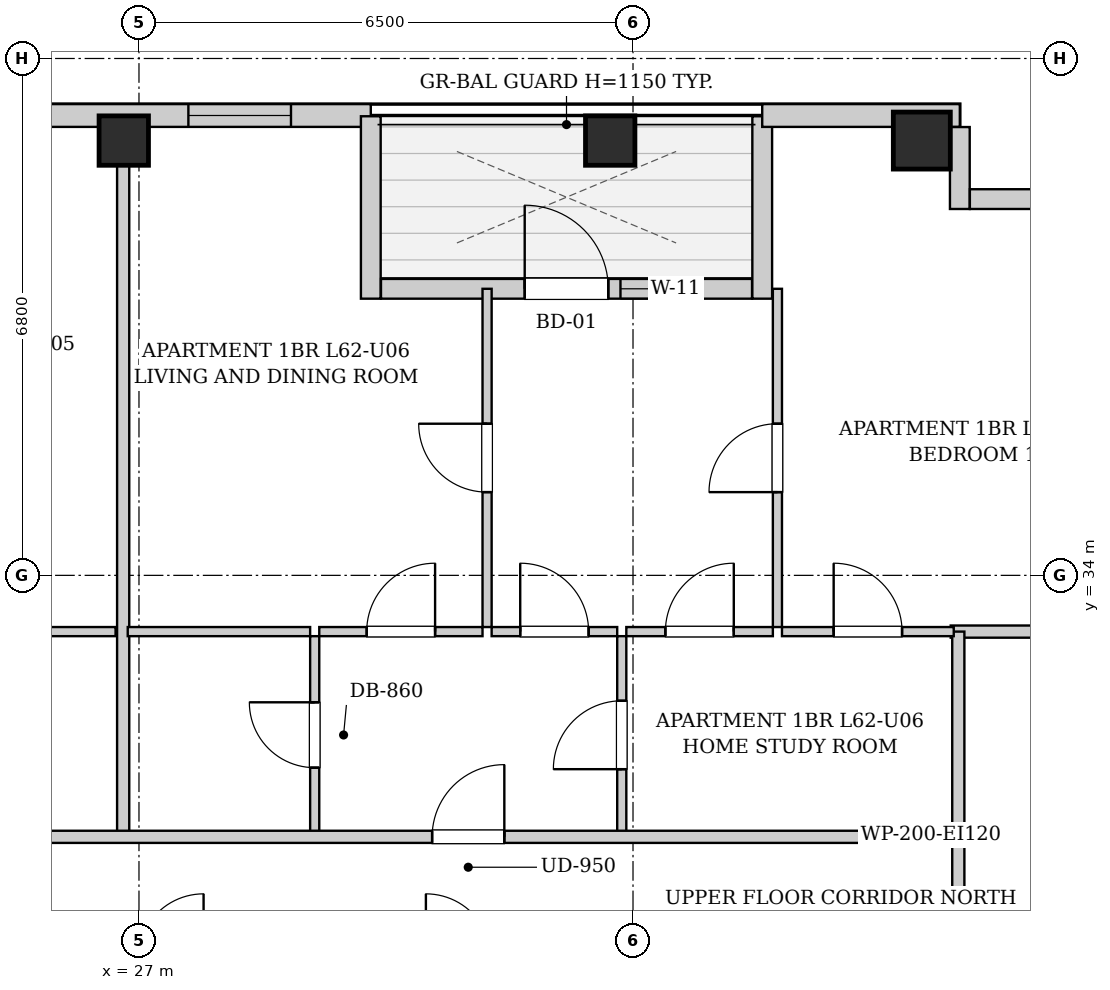
"""IFC4 building model, lengths in metres.
Left out: names, types, materials, properties, quantities, classifications, styles, units other than length and angle.
Written with IfcOpenShell. Run it as: python <this file> out.ifc"""

import sys

from ifc_helpers import new_model, si_unit, direction, frame, frame_2d, origin, origin_2d, place, context, subcontext, project, spatial, rectangle, extrude, element, fill, save


model = new_model("IFC4")
c1 = context("Model", 3, precision=1e-05, world=origin(), true_north=direction((0.0, 1.0)))
c2 = subcontext(c1, "Body", "Model", "MODEL_VIEW")
j1 = project(units=[si_unit("LENGTHUNIT", "METRE"), si_unit("PLANEANGLEUNIT", "RADIAN")], contexts=[c1])
p1 = place(None, origin())
s1 = spatial("IfcSite", under=j1, at=p1, CompositionType="ELEMENT")
p2 = place(p1, origin())
s2 = spatial("IfcBuilding", under=s1, at=p2, CompositionType="ELEMENT")
p3 = place(p2, frame((0.0, 0.0, 214.0)))
s3 = spatial("IfcBuildingStorey", under=s2, at=p3, CompositionType="ELEMENT", Elevation=214.0)
for number, where, z_axis, x_axis in (
    (1, (26.8, 39.72, 0.0), (0.0, 0.0, 1.0), (1.0, 0.0, 0.0)),
    (2, (33.2, 39.72, 0.0), (0.0, 0.0, 1.0), (1.0, 0.0, 0.0)),
):
    element("IfcColumn", number, at=place(p3, frame(where, z_axis=z_axis, x_axis=x_axis)), inside=s3, PredefinedType="COLUMN", context=c2, shape_type="SweptSolid", body=[
        extrude(rectangle(XDim=0.65, YDim=0.65, at=origin_2d()), origin(), (0.0, 0.0, 1.0), 3.3),
    ])
p4 = place(p3, frame((37.3, 39.72, 0.0), z_axis=(0.0, 0.0, 1.0), x_axis=(1.0, 0.0, 0.0)))
e3 = element("IfcColumn", 3, at=p4, inside=s3, PredefinedType="COLUMN", context=c2, shape_type="SweptSolid", body=[
    extrude(rectangle(XDim=0.75, YDim=0.75, at=origin_2d()), origin(), (0.0, 0.0, 1.0), 3.3),
])
p5 = place(p3, frame((13.1, 40.05, 0.0), z_axis=(0.0, 0.0, 1.0), x_axis=(1.0, 0.0, 0.0)))
e4 = element("IfcWall", 4, at=p5, inside=s3, PredefinedType="SOLIDWALL", context=c2, shape_type="SweptSolid", body=[
    extrude(rectangle(XDim=16.95, YDim=0.3, at=frame_2d((8.475, 0.0))), origin(), (0.0, 0.0, 1.0), 3.04),
])
p6 = place(p5, frame((2.865, 0.0, 0.55)))
e5 = element("IfcOpeningElement", 5, at=p6, cuts=e4, PredefinedType="OPENING", context=c2, shape_type="SweptSolid", body=[
    extrude(rectangle(XDim=1.35, YDim=1.2, at=frame_2d((0.675, 0.6))), frame((0.0, 0.16, 0.0), z_axis=(0.0, -1.0, 0.0), x_axis=(1.0, 0.0, 0.0)), (0.0, 0.0, 1.0), 0.32),
])
p7 = place(p5, frame((5.85, 0.0, 0.55)))
e6 = element("IfcOpeningElement", 6, at=p7, cuts=e4, PredefinedType="OPENING", context=c2, shape_type="SweptSolid", body=[
    extrude(rectangle(XDim=1.35, YDim=1.2, at=frame_2d((0.675, 0.6))), frame((0.0, 0.16, 0.0), z_axis=(0.0, -1.0, 0.0), x_axis=(1.0, 0.0, 0.0)), (0.0, 0.0, 1.0), 0.32),
])
p8 = place(p5, frame((8.72, 0.0, 0.55)))
e7 = element("IfcOpeningElement", 7, at=p8, cuts=e4, PredefinedType="OPENING", context=c2, shape_type="SweptSolid", body=[
    extrude(rectangle(XDim=0.68, YDim=1.2, at=frame_2d((0.34, 0.6))), frame((0.0, 0.16, 0.0), z_axis=(0.0, -1.0, 0.0), x_axis=(1.0, 0.0, 0.0)), (0.0, 0.0, 1.0), 0.32),
])
p9 = place(p5, frame((14.55, 0.0, 0.55)))
e8 = element("IfcOpeningElement", 8, at=p9, cuts=e4, PredefinedType="OPENING", context=c2, shape_type="SweptSolid", body=[
    extrude(rectangle(XDim=1.35, YDim=1.2, at=frame_2d((0.675, 0.6))), frame((0.0, 0.16, 0.0), z_axis=(0.0, -1.0, 0.0), x_axis=(1.0, 0.0, 0.0)), (0.0, 0.0, 1.0), 0.32),
])
p10 = place(p3, frame((30.05, 40.04, 0.0), z_axis=(0.0, 0.0, 1.0), x_axis=(0.0, -1.0, 0.0)))
e9 = element("IfcWall", 9, at=p10, inside=s3, PredefinedType="SOLIDWALL", context=c2, shape_type="SweptSolid", body=[
    extrude(rectangle(XDim=2.4, YDim=0.26, at=frame_2d((1.2, 0.0))), origin(), (0.0, 0.0, 1.0), 3.04),
])
p11 = place(p3, frame((30.184, 37.77, 0.0), z_axis=(0.0, 0.0, 1.0), x_axis=(1.0, 0.0, 0.0)))
e10 = element("IfcWall", 10, at=p11, inside=s3, PredefinedType="SOLIDWALL", context=c2, shape_type="SweptSolid", body=[
    extrude(rectangle(XDim=4.882, YDim=0.26, at=frame_2d((2.441, 0.0))), origin(), (0.0, 0.0, 1.0), 3.04),
])
p12 = place(p11, frame((1.891, 0.0, 0.0)))
e11 = element("IfcOpeningElement", 11, at=p12, cuts=e10, PredefinedType="OPENING", context=c2, shape_type="SweptSolid", body=[
    extrude(rectangle(XDim=1.1, YDim=2.0, at=frame_2d((0.55, 1.0))), frame((0.0, 0.14, 0.0), z_axis=(0.0, -1.0, 0.0), x_axis=(1.0, 0.0, 0.0)), (0.0, 0.0, 1.0), 0.28),
])
p13 = place(p11, frame((3.151, 0.0, 0.55)))
e12 = element("IfcOpeningElement", 12, at=p13, cuts=e10, PredefinedType="OPENING", context=c2, shape_type="SweptSolid", body=[
    extrude(rectangle(XDim=0.85, YDim=1.2, at=frame_2d((0.425, 0.6))), frame((0.0, 0.14, 0.0), z_axis=(0.0, -1.0, 0.0), x_axis=(1.0, 0.0, 0.0)), (0.0, 0.0, 1.0), 0.28),
])
p14 = place(p3, frame((35.2, 37.64, 0.0), z_axis=(0.0, 0.0, 1.0), x_axis=(0.0, 1.0, 0.0)))
e13 = element("IfcWall", 13, at=p14, inside=s3, PredefinedType="SOLIDWALL", context=c2, shape_type="SweptSolid", body=[
    extrude(rectangle(XDim=2.4, YDim=0.26, at=frame_2d((1.2, 0.0))), origin(), (0.0, 0.0, 1.0), 3.04),
])
p15 = place(p3, frame((35.2, 40.05, 0.0), z_axis=(0.0, 0.0, 1.0), x_axis=(1.0, 0.0, 0.0)))
e14 = element("IfcWall", 14, at=p15, inside=s3, PredefinedType="SOLIDWALL", context=c2, shape_type="SweptSolid", body=[
    extrude(rectangle(XDim=2.6, YDim=0.3, at=frame_2d((1.3, 0.0))), origin(), (0.0, 0.0, 1.0), 3.04),
])
p16 = place(p3, frame((37.8, 39.898, 0.0), z_axis=(0.0, 0.0, 1.0), x_axis=(0.0, -1.0, 0.0)))
e15 = element("IfcWall", 15, at=p16, inside=s3, PredefinedType="SOLIDWALL", context=c2, shape_type="SweptSolid", body=[
    extrude(rectangle(XDim=1.078, YDim=0.26, at=frame_2d((0.539, 0.0))), origin(), (0.0, 0.0, 1.0), 3.04),
])
p17 = place(p3, frame((37.932, 38.95, 0.0), z_axis=(0.0, 0.0, 1.0), x_axis=(1.0, 0.0, 0.0)))
e16 = element("IfcWall", 16, at=p17, inside=s3, PredefinedType="SOLIDWALL", context=c2, shape_type="SweptSolid", body=[
    extrude(rectangle(XDim=1.248, YDim=0.26, at=frame_2d((0.624, 0.0))), origin(), (0.0, 0.0, 1.0), 3.04),
])
p18 = place(p3, frame((37.78, 28.98, 0.0), z_axis=(0.0, 0.0, 1.0), x_axis=(0.0, 1.0, 0.0)))
e17 = element("IfcWall", 17, at=p18, inside=s3, PredefinedType="PARTITIONING", context=c2, shape_type="SweptSolid", body=[
    extrude(rectangle(XDim=1.58, YDim=0.16, at=frame_2d((0.79, 0.0))), origin(), (0.0, 0.0, 1.0), 3.04),
])
p19 = place(p3, frame((23.535, 33.26, 0.0), z_axis=(0.0, 0.0, 1.0), x_axis=(1.0, 0.0, 0.0)))
e18 = element("IfcWall", 18, at=p19, inside=s3, PredefinedType="PARTITIONING", context=c2, shape_type="SweptSolid", body=[
    extrude(rectangle(XDim=3.157, YDim=0.12, at=frame_2d((1.579, 0.0))), origin(), (0.0, 0.0, 1.0), 3.04),
])
p20 = place(p19, frame((1.129, 0.0, 0.0)))
e19 = element("IfcOpeningElement", 19, at=p20, cuts=e18, PredefinedType="OPENING", context=c2, shape_type="SweptSolid", body=[
    extrude(rectangle(XDim=0.9, YDim=2.05, at=frame_2d((0.45, 1.025))), frame((0.0, 0.07, 0.0), z_axis=(0.0, -1.0, 0.0), x_axis=(1.0, 0.0, 0.0)), (0.0, 0.0, 1.0), 0.14),
])
p21 = place(p3, frame((37.68, 33.26, 0.0), z_axis=(0.0, 0.0, 1.0), x_axis=(1.0, 0.0, 0.0)))
e20 = element("IfcWall", 20, at=p21, inside=s3, PredefinedType="PARTITIONING", context=c2, shape_type="SweptSolid", body=[
    extrude(rectangle(XDim=2.34, YDim=0.16, at=frame_2d((1.17, 0.0))), origin(), (0.0, 0.0, 1.0), 3.04),
])
p22 = place(p3, frame((37.78, 30.6, 0.0), z_axis=(0.0, 0.0, 1.0), x_axis=(0.0, 1.0, 0.0)))
e21 = element("IfcWall", 21, at=p22, inside=s3, PredefinedType="PARTITIONING", context=c2, shape_type="SweptSolid", body=[
    extrude(rectangle(XDim=2.66, YDim=0.16, at=frame_2d((1.33, 0.0))), origin(), (0.0, 0.0, 1.0), 3.04),
])
p23 = place(p3, frame((26.792, 30.6, 0.0), z_axis=(0.0, 0.0, 1.0), x_axis=(0.0, 1.0, 0.0)))
e22 = element("IfcWall", 22, at=p23, inside=s3, PredefinedType="PARTITIONING", context=c2, shape_type="SweptSolid", body=[
    extrude(rectangle(XDim=9.32, YDim=0.16, at=frame_2d((4.66, 0.0))), origin(), (0.0, 0.0, 1.0), 3.04),
])
p24 = place(p3, frame((29.312, 30.6, 0.0), z_axis=(0.0, 0.0, 1.0), x_axis=(0.0, 1.0, 0.0)))
e23 = element("IfcWall", 23, at=p24, inside=s3, PredefinedType="PARTITIONING", context=c2, shape_type="SweptSolid", body=[
    extrude(rectangle(XDim=2.6, YDim=0.12, at=frame_2d((1.3, 0.0))), origin(), (0.0, 0.0, 1.0), 3.04),
])
p25 = place(p24, frame((0.87, 0.0, 0.0)))
e24 = element("IfcOpeningElement", 24, at=p25, cuts=e23, PredefinedType="OPENING", context=c2, shape_type="SweptSolid", body=[
    extrude(rectangle(XDim=0.86, YDim=2.05, at=frame_2d((0.43, 1.025))), frame((0.0, 0.07, 0.0), z_axis=(0.0, -1.0, 0.0), x_axis=(1.0, 0.0, 0.0)), (0.0, 0.0, 1.0), 0.14),
])
p26 = place(p3, frame((26.852, 33.26, 0.0), z_axis=(0.0, 0.0, 1.0), x_axis=(1.0, 0.0, 0.0)))
e25 = element("IfcWall", 25, at=p26, inside=s3, PredefinedType="PARTITIONING", context=c2, shape_type="SweptSolid", body=[
    extrude(rectangle(XDim=2.4, YDim=0.12, at=frame_2d((1.2, 0.0))), origin(), (0.0, 0.0, 1.0), 3.04),
])
p27 = place(p3, frame((33.352, 30.6, 0.0), z_axis=(0.0, 0.0, 1.0), x_axis=(0.0, 1.0, 0.0)))
e26 = element("IfcWall", 26, at=p27, inside=s3, PredefinedType="PARTITIONING", context=c2, shape_type="SweptSolid", body=[
    extrude(rectangle(XDim=2.6, YDim=0.12, at=frame_2d((1.3, 0.0))), origin(), (0.0, 0.0, 1.0), 3.04),
])
p28 = place(p27, frame((0.85, 0.0, 0.0)))
e27 = element("IfcOpeningElement", 27, at=p28, cuts=e26, PredefinedType="OPENING", context=c2, shape_type="SweptSolid", body=[
    extrude(rectangle(XDim=0.9, YDim=2.05, at=frame_2d((0.45, 1.025))), frame((0.0, 0.07, 0.0), z_axis=(0.0, -1.0, 0.0), x_axis=(1.0, 0.0, 0.0)), (0.0, 0.0, 1.0), 0.14),
])
p29 = place(p3, frame((29.372, 33.26, 0.0), z_axis=(0.0, 0.0, 1.0), x_axis=(1.0, 0.0, 0.0)))
e28 = element("IfcWall", 28, at=p29, inside=s3, PredefinedType="PARTITIONING", context=c2, shape_type="SweptSolid", body=[
    extrude(rectangle(XDim=2.148, YDim=0.12, at=frame_2d((1.074, 0.0))), origin(), (0.0, 0.0, 1.0), 3.04),
])
p30 = place(p29, frame((0.624, 0.0, 0.0)))
e29 = element("IfcOpeningElement", 29, at=p30, cuts=e28, PredefinedType="OPENING", context=c2, shape_type="SweptSolid", body=[
    extrude(rectangle(XDim=0.9, YDim=2.05, at=frame_2d((0.45, 1.025))), frame((0.0, 0.07, 0.0), z_axis=(0.0, -1.0, 0.0), x_axis=(1.0, 0.0, 0.0)), (0.0, 0.0, 1.0), 0.14),
])
p31 = place(p3, frame((31.64, 33.26, 0.0), z_axis=(0.0, 0.0, 1.0), x_axis=(1.0, 0.0, 0.0)))
e30 = element("IfcWall", 30, at=p31, inside=s3, PredefinedType="PARTITIONING", context=c2, shape_type="SweptSolid", body=[
    extrude(rectangle(XDim=1.652, YDim=0.12, at=frame_2d((0.826, 0.0))), origin(), (0.0, 0.0, 1.0), 3.04),
])
p32 = place(p31, frame((0.376, 0.0, 0.0)))
e31 = element("IfcOpeningElement", 31, at=p32, cuts=e30, PredefinedType="OPENING", context=c2, shape_type="SweptSolid", body=[
    extrude(rectangle(XDim=0.9, YDim=2.05, at=frame_2d((0.45, 1.025))), frame((0.0, 0.07, 0.0), z_axis=(0.0, -1.0, 0.0), x_axis=(1.0, 0.0, 0.0)), (0.0, 0.0, 1.0), 0.14),
])
p33 = place(p3, frame((33.412, 33.26, 0.0), z_axis=(0.0, 0.0, 1.0), x_axis=(1.0, 0.0, 0.0)))
e32 = element("IfcWall", 32, at=p33, inside=s3, PredefinedType="PARTITIONING", context=c2, shape_type="SweptSolid", body=[
    extrude(rectangle(XDim=1.928, YDim=0.12, at=frame_2d((0.964, 0.0))), origin(), (0.0, 0.0, 1.0), 3.04),
])
p34 = place(p33, frame((0.514, 0.0, 0.0)))
e33 = element("IfcOpeningElement", 33, at=p34, cuts=e32, PredefinedType="OPENING", context=c2, shape_type="SweptSolid", body=[
    extrude(rectangle(XDim=0.9, YDim=2.05, at=frame_2d((0.45, 1.025))), frame((0.0, 0.07, 0.0), z_axis=(0.0, -1.0, 0.0), x_axis=(1.0, 0.0, 0.0)), (0.0, 0.0, 1.0), 0.14),
])
p35 = place(p3, frame((35.46, 33.26, 0.0), z_axis=(0.0, 0.0, 1.0), x_axis=(1.0, 0.0, 0.0)))
e34 = element("IfcWall", 34, at=p35, inside=s3, PredefinedType="PARTITIONING", context=c2, shape_type="SweptSolid", body=[
    extrude(rectangle(XDim=2.26, YDim=0.12, at=frame_2d((1.13, 0.0))), origin(), (0.0, 0.0, 1.0), 3.04),
])
p36 = place(p35, frame((0.68, 0.0, 0.0)))
e35 = element("IfcOpeningElement", 35, at=p36, cuts=e34, PredefinedType="OPENING", context=c2, shape_type="SweptSolid", body=[
    extrude(rectangle(XDim=0.9, YDim=2.05, at=frame_2d((0.45, 1.025))), frame((0.0, 0.07, 0.0), z_axis=(0.0, -1.0, 0.0), x_axis=(1.0, 0.0, 0.0)), (0.0, 0.0, 1.0), 0.14),
])
p37 = place(p3, frame((31.58, 33.32, 0.0), z_axis=(0.0, 0.0, 1.0), x_axis=(0.0, 1.0, 0.0)))
e36 = element("IfcWall", 36, at=p37, inside=s3, PredefinedType="PARTITIONING", context=c2, shape_type="SweptSolid", body=[
    extrude(rectangle(XDim=4.45, YDim=0.12, at=frame_2d((2.225, 0.0))), origin(), (0.0, 0.0, 1.0), 3.04),
])
p38 = place(p37, frame((1.775, 0.0, 0.0)))
e37 = element("IfcOpeningElement", 37, at=p38, cuts=e36, PredefinedType="OPENING", context=c2, shape_type="SweptSolid", body=[
    extrude(rectangle(XDim=0.9, YDim=2.05, at=frame_2d((0.45, 1.025))), frame((0.0, 0.07, 0.0), z_axis=(0.0, -1.0, 0.0), x_axis=(1.0, 0.0, 0.0)), (0.0, 0.0, 1.0), 0.14),
])
p39 = place(p3, frame((35.4, 33.32, 0.0), z_axis=(0.0, 0.0, 1.0), x_axis=(0.0, 1.0, 0.0)))
e38 = element("IfcWall", 38, at=p39, inside=s3, PredefinedType="PARTITIONING", context=c2, shape_type="SweptSolid", body=[
    extrude(rectangle(XDim=4.45, YDim=0.12, at=frame_2d((2.225, 0.0))), origin(), (0.0, 0.0, 1.0), 3.04),
])
p40 = place(p39, frame((1.775, 0.0, 0.0)))
e39 = element("IfcOpeningElement", 39, at=p40, cuts=e38, PredefinedType="OPENING", context=c2, shape_type="SweptSolid", body=[
    extrude(rectangle(XDim=0.9, YDim=2.05, at=frame_2d((0.45, 1.025))), frame((0.0, 0.07, 0.0), z_axis=(0.0, -1.0, 0.0), x_axis=(1.0, 0.0, 0.0)), (0.0, 0.0, 1.0), 0.14),
])
p41 = place(p3, frame((13.15, 30.56, 0.0), z_axis=(0.0, 0.0, 1.0), x_axis=(1.0, 0.0, 0.0)))
e40 = element("IfcWall", 40, at=p41, inside=s3, PredefinedType="PARTITIONING", context=c2, shape_type="SweptSolid", body=[
    extrude(rectangle(XDim=24.6, YDim=0.16, at=frame_2d((12.3, 0.0))), origin(), (0.0, 0.0, 1.0), 3.04),
])
p42 = place(p41, frame((3.115, 0.0, 0.0)))
e41 = element("IfcOpeningElement", 41, at=p42, cuts=e40, PredefinedType="OPENING", context=c2, shape_type="SweptSolid", body=[
    extrude(rectangle(XDim=0.95, YDim=2.1, at=frame_2d((0.475, 1.05))), frame((0.0, 0.09, 0.0), z_axis=(0.0, -1.0, 0.0), x_axis=(1.0, 0.0, 0.0)), (0.0, 0.0, 1.0), 0.18),
])
p43 = place(p41, frame((11.489, 0.0, 0.0)))
e42 = element("IfcOpeningElement", 42, at=p43, cuts=e40, PredefinedType="OPENING", context=c2, shape_type="SweptSolid", body=[
    extrude(rectangle(XDim=0.95, YDim=2.1, at=frame_2d((0.475, 1.05))), frame((0.0, 0.09, 0.0), z_axis=(0.0, -1.0, 0.0), x_axis=(1.0, 0.0, 0.0)), (0.0, 0.0, 1.0), 0.18),
])
p44 = place(p41, frame((17.707, 0.0, 0.0)))
e43 = element("IfcOpeningElement", 43, at=p44, cuts=e40, PredefinedType="OPENING", context=c2, shape_type="SweptSolid", body=[
    extrude(rectangle(XDim=0.95, YDim=2.1, at=frame_2d((0.475, 1.05))), frame((0.0, 0.09, 0.0), z_axis=(0.0, -1.0, 0.0), x_axis=(1.0, 0.0, 0.0)), (0.0, 0.0, 1.0), 0.18),
])
p45 = place(p25, origin())
e44 = element("IfcDoor", 44, at=p45, inside=s3, OperationType="SINGLE_SWING_RIGHT", PredefinedType="DOOR", context=c2, shape_type="SweptSolid", body=[
    extrude(rectangle(XDim=0.86, YDim=2.05, at=frame_2d((0.43, 1.025))), frame((0.0, 0.025, 0.0), z_axis=(0.0, -1.0, 0.0), x_axis=(1.0, 0.0, 0.0)), (0.0, 0.0, 1.0), 0.05),
])
fill(e24, e44)
p46 = place(p28, origin())
e45 = element("IfcDoor", 45, at=p46, inside=s3, OperationType="SINGLE_SWING_LEFT", PredefinedType="DOOR", context=c2, shape_type="SweptSolid", body=[
    extrude(rectangle(XDim=0.9, YDim=2.05, at=frame_2d((0.45, 1.025))), frame((0.0, 0.025, 0.0), z_axis=(0.0, -1.0, 0.0), x_axis=(1.0, 0.0, 0.0)), (0.0, 0.0, 1.0), 0.05),
])
fill(e27, e45)
p47 = place(p30, origin())
e46 = element("IfcDoor", 46, at=p47, inside=s3, OperationType="SINGLE_SWING_RIGHT", PredefinedType="DOOR", context=c2, shape_type="SweptSolid", body=[
    extrude(rectangle(XDim=0.9, YDim=2.05, at=frame_2d((0.45, 1.025))), frame((0.0, 0.025, 0.0), z_axis=(0.0, -1.0, 0.0), x_axis=(1.0, 0.0, 0.0)), (0.0, 0.0, 1.0), 0.05),
])
fill(e29, e46)
p48 = place(p32, origin())
e47 = element("IfcDoor", 47, at=p48, inside=s3, OperationType="SINGLE_SWING_LEFT", PredefinedType="DOOR", context=c2, shape_type="SweptSolid", body=[
    extrude(rectangle(XDim=0.9, YDim=2.05, at=frame_2d((0.45, 1.025))), frame((0.0, 0.025, 0.0), z_axis=(0.0, -1.0, 0.0), x_axis=(1.0, 0.0, 0.0)), (0.0, 0.0, 1.0), 0.05),
])
fill(e31, e47)
p49 = place(p34, origin())
e48 = element("IfcDoor", 48, at=p49, inside=s3, OperationType="SINGLE_SWING_RIGHT", PredefinedType="DOOR", context=c2, shape_type="SweptSolid", body=[
    extrude(rectangle(XDim=0.9, YDim=2.05, at=frame_2d((0.45, 1.025))), frame((0.0, 0.025, 0.0), z_axis=(0.0, -1.0, 0.0), x_axis=(1.0, 0.0, 0.0)), (0.0, 0.0, 1.0), 0.05),
])
fill(e33, e48)
p50 = place(p36, origin())
e49 = element("IfcDoor", 49, at=p50, inside=s3, OperationType="SINGLE_SWING_LEFT", PredefinedType="DOOR", context=c2, shape_type="SweptSolid", body=[
    extrude(rectangle(XDim=0.9, YDim=2.05, at=frame_2d((0.45, 1.025))), frame((0.0, 0.025, 0.0), z_axis=(0.0, -1.0, 0.0), x_axis=(1.0, 0.0, 0.0)), (0.0, 0.0, 1.0), 0.05),
])
fill(e35, e49)
p51 = place(p38, origin())
e50 = element("IfcDoor", 50, at=p51, inside=s3, OperationType="SINGLE_SWING_RIGHT", PredefinedType="DOOR", context=c2, shape_type="SweptSolid", body=[
    extrude(rectangle(XDim=0.9, YDim=2.05, at=frame_2d((0.45, 1.025))), frame((0.0, 0.025, 0.0), z_axis=(0.0, -1.0, 0.0), x_axis=(1.0, 0.0, 0.0)), (0.0, 0.0, 1.0), 0.05),
])
fill(e37, e50)
p52 = place(p40, origin())
e51 = element("IfcDoor", 51, at=p52, inside=s3, OperationType="SINGLE_SWING_LEFT", PredefinedType="DOOR", context=c2, shape_type="SweptSolid", body=[
    extrude(rectangle(XDim=0.9, YDim=2.05, at=frame_2d((0.45, 1.025))), frame((0.0, 0.025, 0.0), z_axis=(0.0, -1.0, 0.0), x_axis=(1.0, 0.0, 0.0)), (0.0, 0.0, 1.0), 0.05),
])
fill(e39, e51)
p53 = place(p44, origin())
e52 = element("IfcDoor", 52, at=p53, inside=s3, OperationType="SINGLE_SWING_RIGHT", PredefinedType="DOOR", context=c2, shape_type="SweptSolid", body=[
    extrude(rectangle(XDim=0.95, YDim=2.1, at=frame_2d((0.475, 1.05))), frame((0.0, 0.025, 0.0), z_axis=(0.0, -1.0, 0.0), x_axis=(1.0, 0.0, 0.0)), (0.0, 0.0, 1.0), 0.05),
])
fill(e43, e52)
p54 = place(p12, origin())
e53 = element("IfcDoor", 53, at=p54, inside=s3, OperationType="SINGLE_SWING_LEFT", PredefinedType="DOOR", context=c2, shape_type="SweptSolid", body=[
    extrude(rectangle(XDim=1.1, YDim=2.0, at=frame_2d((0.55, 1.0))), frame((0.0, 0.025, 0.0), z_axis=(0.0, -1.0, 0.0), x_axis=(1.0, 0.0, 0.0)), (0.0, 0.0, 1.0), 0.05),
])
fill(e11, e53)
p55 = place(p9, origin())
e54 = element("IfcWindow", 54, at=p55, inside=s3, PartitioningType="SINGLE_PANEL", PredefinedType="WINDOW", context=c2, shape_type="SweptSolid", body=[
    extrude(rectangle(XDim=1.35, YDim=1.2, at=frame_2d((0.675, 0.6))), frame((0.0, 0.03, 0.0), z_axis=(0.0, -1.0, 0.0), x_axis=(1.0, 0.0, 0.0)), (0.0, 0.0, 1.0), 0.06),
])
fill(e8, e54)
p56 = place(p13, origin())
e55 = element("IfcWindow", 55, at=p56, inside=s3, PartitioningType="SINGLE_PANEL", PredefinedType="WINDOW", context=c2, shape_type="SweptSolid", body=[
    extrude(rectangle(XDim=0.85, YDim=1.2, at=frame_2d((0.425, 0.6))), frame((0.0, 0.03, 0.0), z_axis=(0.0, -1.0, 0.0), x_axis=(1.0, 0.0, 0.0)), (0.0, 0.0, 1.0), 0.06),
])
fill(e12, e55)
save(model, sys.argv[1])
